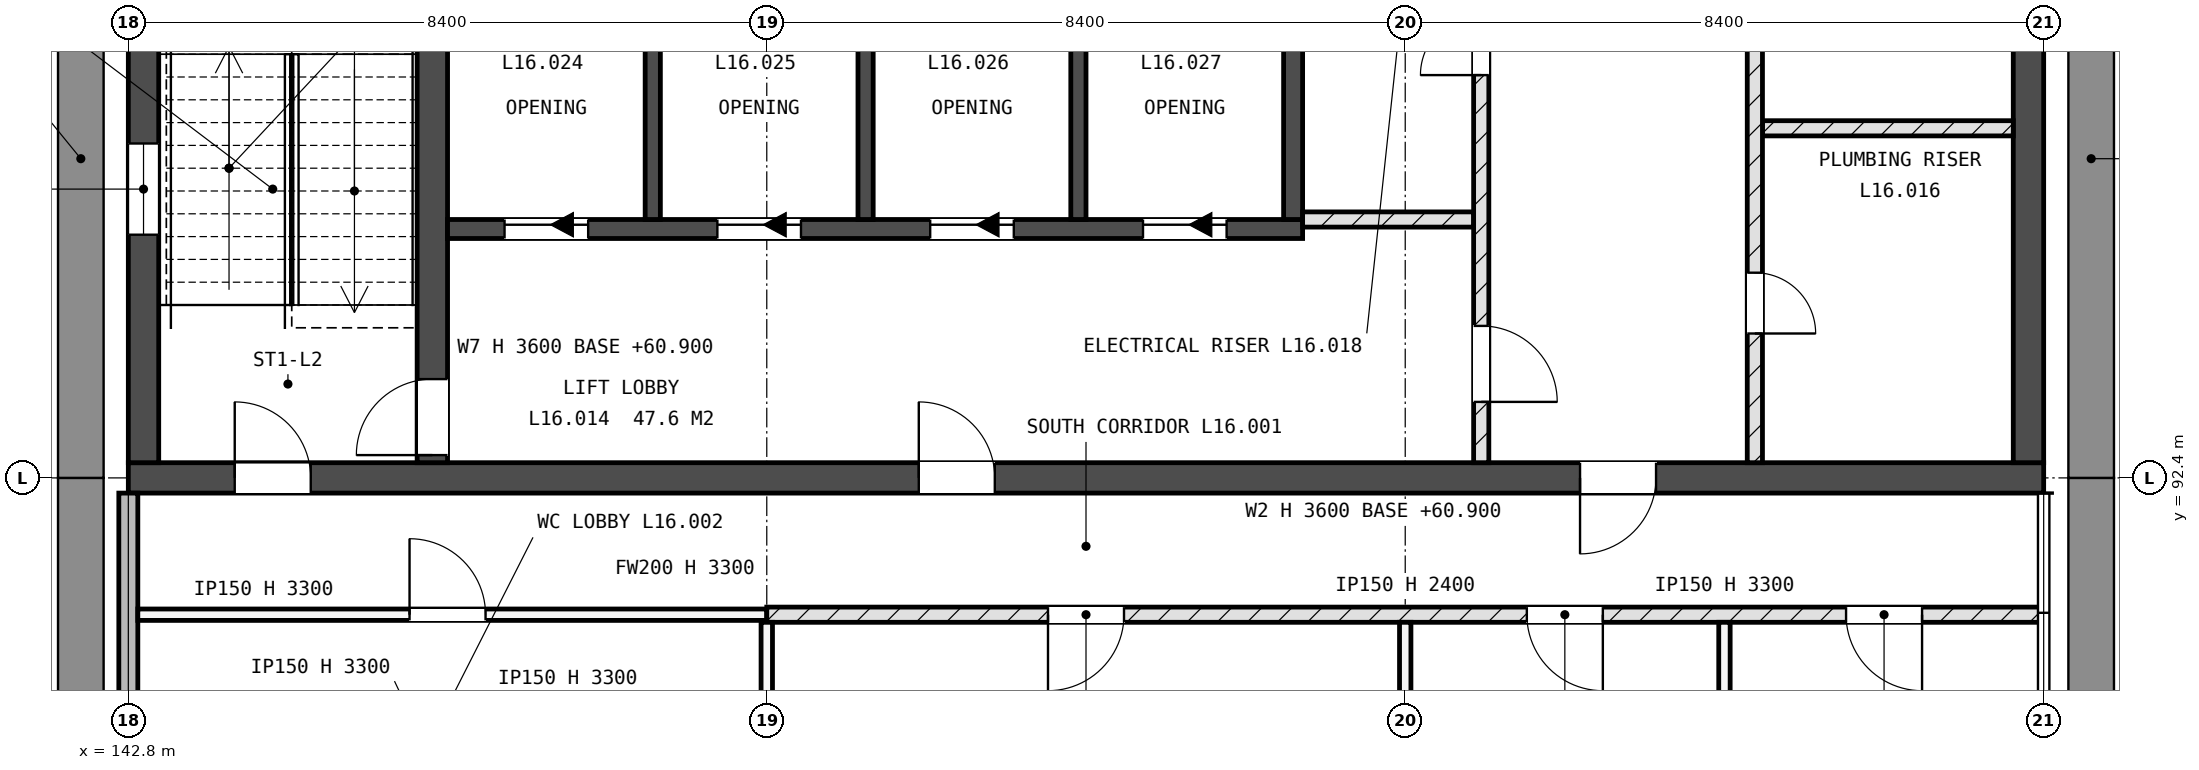
"""IFC4 building model, lengths in metres.
Left out: names, types, materials, properties, quantities, classifications, styles, units other than length and angle.
Written with IfcOpenShell. Run it as: python <this file> out.ifc"""

import sys

from ifc_helpers import new_model, si_unit, direction, frame, frame_2d, origin, place, context, subcontext, project, spatial, rectangle, extrude, element, fill, save


model = new_model("IFC4")
c1 = context("Model", 3, precision=1e-05, world=origin(), true_north=direction((0.0, 1.0)))
c2 = subcontext(c1, "Body", "Model", "MODEL_VIEW")
j1 = project(units=[si_unit("LENGTHUNIT", "METRE"), si_unit("PLANEANGLEUNIT", "RADIAN")], contexts=[c1])
p1 = place(None, origin())
s1 = spatial("IfcSite", under=j1, at=p1, CompositionType="ELEMENT")
p2 = place(p1, origin())
s2 = spatial("IfcBuilding", under=s1, at=p2, CompositionType="ELEMENT")
p3 = place(p2, frame((0.0, 0.0, 61.2)))
s3 = spatial("IfcBuildingStorey", under=s2, at=p3, CompositionType="ELEMENT", Elevation=61.2)
p4 = place(p3, frame((142.8, 92.4, -0.3), z_axis=(0.0, 0.0, 1.0), x_axis=(1.0, 0.0, 0.0)))
e1 = element("IfcWall", 1, at=p4, inside=s3, PredefinedType="SHEAR", context=c2, shape_type="SweptSolid", body=[
    extrude(rectangle(XDim=25.2, YDim=0.4, at=frame_2d((12.6, 0.0))), origin(), (0.0, 0.0, 1.0), 3.6),
])
p5 = place(p4, frame((1.4, 0.0, 0.3)))
e2 = element("IfcOpeningElement", 2, at=p5, cuts=e1, PredefinedType="OPENING", context=c2, shape_type="SweptSolid", body=[
    extrude(rectangle(XDim=1.0, YDim=2.1, at=frame_2d((0.5, 1.05))), frame((0.0, 0.21, 0.0), z_axis=(0.0, -1.0, 0.0), x_axis=(1.0, 0.0, 0.0)), (0.0, 0.0, 1.0), 0.42),
])
p6 = place(p4, frame((19.1, 0.0, 0.3)))
e3 = element("IfcOpeningElement", 3, at=p6, cuts=e1, PredefinedType="OPENING", context=c2, shape_type="SweptSolid", body=[
    extrude(rectangle(XDim=1.0, YDim=2.1, at=frame_2d((0.5, 1.05))), frame((0.0, 0.21, 0.0), z_axis=(0.0, -1.0, 0.0), x_axis=(1.0, 0.0, 0.0)), (0.0, 0.0, 1.0), 0.42),
])
p7 = place(p4, frame((10.4, 0.0, 0.3)))
e4 = element("IfcOpeningElement", 4, at=p7, cuts=e1, PredefinedType="OPENING", context=c2, shape_type="SweptSolid", body=[
    extrude(rectangle(XDim=1.0, YDim=2.1, at=frame_2d((0.5, 1.05))), frame((0.0, 0.21, 0.0), z_axis=(0.0, -1.0, 0.0), x_axis=(1.0, 0.0, 0.0)), (0.0, 0.0, 1.0), 0.42),
])
p8 = place(p3, frame((143.0, 92.6, -0.3), z_axis=(0.0, 0.0, 1.0), x_axis=(0.0, 1.0, 0.0)))
e5 = element("IfcWall", 5, at=p8, inside=s3, PredefinedType="SHEAR", context=c2, shape_type="SweptSolid", body=[
    extrude(rectangle(XDim=16.4, YDim=0.4, at=frame_2d((8.2, 0.0))), origin(), (0.0, 0.0, 1.0), 3.6),
])
p9 = place(p8, frame((3.0, 0.0, 1.9)))
e6 = element("IfcOpeningElement", 6, at=p9, cuts=e5, PredefinedType="OPENING", context=c2, shape_type="SweptSolid", body=[
    extrude(rectangle(XDim=1.2, YDim=0.9, at=frame_2d((0.6, 0.45))), frame((0.0, 0.21, 0.0), z_axis=(0.0, -1.0, 0.0), x_axis=(1.0, 0.0, 0.0)), (0.0, 0.0, 1.0), 0.42),
])
p10 = place(p3, frame((167.8, 92.6, -0.3), z_axis=(0.0, 0.0, 1.0), x_axis=(0.0, 1.0, 0.0)))
e7 = element("IfcWall", 7, at=p10, inside=s3, PredefinedType="SHEAR", context=c2, shape_type="SweptSolid", body=[
    extrude(rectangle(XDim=16.4, YDim=0.4, at=frame_2d((8.2, 0.0))), origin(), (0.0, 0.0, 1.0), 3.6),
])
p11 = place(p10, frame((12.2, 0.0, 1.9)))
e8 = element("IfcOpeningElement", 8, at=p11, cuts=e7, PredefinedType="OPENING", context=c2, shape_type="SweptSolid", body=[
    extrude(rectangle(XDim=1.2, YDim=0.9, at=frame_2d((0.6, 0.45))), frame((0.0, 0.21, 0.0), z_axis=(0.0, -1.0, 0.0), x_axis=(1.0, 0.0, 0.0)), (0.0, 0.0, 1.0), 0.42),
])
p12 = place(p3, frame((146.8, 92.6, -0.3), z_axis=(0.0, 0.0, 1.0), x_axis=(0.0, 1.0, 0.0)))
e9 = element("IfcWall", 9, at=p12, inside=s3, PredefinedType="SHEAR", context=c2, shape_type="SweptSolid", body=[
    extrude(rectangle(XDim=7.525, YDim=0.4, at=frame_2d((3.762, 0.0))), origin(), (0.0, 0.0, 1.0), 3.6),
])
p13 = place(p12, frame((0.1, 0.0, 0.3)))
e10 = element("IfcOpeningElement", 10, at=p13, cuts=e9, PredefinedType="OPENING", context=c2, shape_type="SweptSolid", body=[
    extrude(rectangle(XDim=1.0, YDim=2.1, at=frame_2d((0.5, 1.05))), frame((0.0, 0.21, 0.0), z_axis=(0.0, -1.0, 0.0), x_axis=(1.0, 0.0, 0.0)), (0.0, 0.0, 1.0), 0.42),
])
p14 = place(p3, frame((147.0, 95.675, -0.3), z_axis=(0.0, 0.0, 1.0), x_axis=(1.0, 0.0, 0.0)))
e11 = element("IfcWall", 11, at=p14, inside=s3, PredefinedType="SHEAR", context=c2, shape_type="SweptSolid", body=[
    extrude(rectangle(XDim=11.25, YDim=0.25, at=frame_2d((5.625, 0.0))), origin(), (0.0, 0.0, 1.0), 3.6),
])
p15 = place(p14, frame((0.75, 0.0, 0.3)))
e12 = element("IfcOpeningElement", 12, at=p15, cuts=e11, PredefinedType="OPENING", context=c2, shape_type="SweptSolid", body=[
    extrude(rectangle(XDim=1.1, YDim=2.1, at=frame_2d((0.55, 1.05))), frame((0.0, 0.135, 0.0), z_axis=(0.0, -1.0, 0.0), x_axis=(1.0, 0.0, 0.0)), (0.0, 0.0, 1.0), 0.27),
])
p16 = place(p14, frame((3.55, 0.0, 0.3)))
e13 = element("IfcOpeningElement", 13, at=p16, cuts=e11, PredefinedType="OPENING", context=c2, shape_type="SweptSolid", body=[
    extrude(rectangle(XDim=1.1, YDim=2.1, at=frame_2d((0.55, 1.05))), frame((0.0, 0.135, 0.0), z_axis=(0.0, -1.0, 0.0), x_axis=(1.0, 0.0, 0.0)), (0.0, 0.0, 1.0), 0.27),
])
p17 = place(p14, frame((6.35, 0.0, 0.3)))
e14 = element("IfcOpeningElement", 14, at=p17, cuts=e11, PredefinedType="OPENING", context=c2, shape_type="SweptSolid", body=[
    extrude(rectangle(XDim=1.1, YDim=2.1, at=frame_2d((0.55, 1.05))), frame((0.0, 0.135, 0.0), z_axis=(0.0, -1.0, 0.0), x_axis=(1.0, 0.0, 0.0)), (0.0, 0.0, 1.0), 0.27),
])
p18 = place(p14, frame((9.15, 0.0, 0.3)))
e15 = element("IfcOpeningElement", 15, at=p18, cuts=e11, PredefinedType="OPENING", context=c2, shape_type="SweptSolid", body=[
    extrude(rectangle(XDim=1.1, YDim=2.1, at=frame_2d((0.55, 1.05))), frame((0.0, 0.135, 0.0), z_axis=(0.0, -1.0, 0.0), x_axis=(1.0, 0.0, 0.0)), (0.0, 0.0, 1.0), 0.27),
])
p19 = place(p3, frame((158.125, 95.8, -0.3), z_axis=(0.0, 0.0, 1.0), x_axis=(0.0, 1.0, 0.0)))
e16 = element("IfcWall", 16, at=p19, inside=s3, PredefinedType="SHEAR", context=c2, shape_type="SweptSolid", body=[
    extrude(rectangle(XDim=2.9, YDim=0.25, at=frame_2d((1.45, 0.0))), origin(), (0.0, 0.0, 1.0), 3.6),
])
for number, where, z_axis, x_axis in (
    (17, (149.7, 95.8, -0.3), (0.0, 0.0, 1.0), (0.0, 1.0, 0.0)),
    (18, (152.5, 95.8, -0.3), (0.0, 0.0, 1.0), (0.0, 1.0, 0.0)),
    (19, (155.3, 95.8, -0.3), (0.0, 0.0, 1.0), (0.0, 1.0, 0.0)),
):
    element("IfcWall", number, at=place(p3, frame(where, z_axis=z_axis, x_axis=x_axis)), inside=s3, PredefinedType="SHEAR", context=c2, shape_type="SweptSolid", body=[
        extrude(rectangle(XDim=2.9, YDim=0.2, at=frame_2d((1.45, 0.0))), origin(), (0.0, 0.0, 1.0), 3.6),
    ])
p20 = place(p3, frame((142.8, 84.325, 0.0), z_axis=(0.0, 0.0, 1.0), x_axis=(0.0, 1.0, 0.0)))
e20 = element("IfcWall", 20, at=p20, inside=s3, PredefinedType="STANDARD", context=c2, shape_type="SweptSolid", body=[
    extrude(rectangle(XDim=7.875, YDim=0.25, at=frame_2d((3.938, 0.0))), origin(), (0.0, 0.0, 1.0), 3.3),
])
p21 = place(p20, frame((2.375, 0.0, 2.1)))
e21 = element("IfcOpeningElement", 21, at=p21, cuts=e20, PredefinedType="OPENING", context=c2, shape_type="SweptSolid", body=[
    extrude(rectangle(XDim=0.9, YDim=0.6, at=frame_2d((0.45, 0.3))), frame((0.0, 0.135, 0.0), z_axis=(0.0, -1.0, 0.0), x_axis=(1.0, 0.0, 0.0)), (0.0, 0.0, 1.0), 0.27),
])
p22 = place(p3, frame((142.925, 90.6, 0.0), z_axis=(0.0, 0.0, 1.0), x_axis=(1.0, 0.0, 0.0)))
e22 = element("IfcWall", 22, at=p22, inside=s3, PredefinedType="PARTITIONING", context=c2, shape_type="SweptSolid", body=[
    extrude(rectangle(XDim=8.275, YDim=0.15, at=frame_2d((4.137, 0.0))), origin(), (0.0, 0.0, 1.0), 3.3),
])
p23 = place(p22, frame((3.575, 0.0, 0.0)))
e23 = element("IfcOpeningElement", 23, at=p23, cuts=e22, PredefinedType="OPENING", context=c2, shape_type="SweptSolid", body=[
    extrude(rectangle(XDim=1.0, YDim=2.1, at=frame_2d((0.5, 1.05))), frame((0.0, 0.085, 0.0), z_axis=(0.0, -1.0, 0.0), x_axis=(1.0, 0.0, 0.0)), (0.0, 0.0, 1.0), 0.17),
])
p24 = place(p3, frame((151.2, 90.6, 0.0), z_axis=(0.0, 0.0, 1.0), x_axis=(1.0, 0.0, 0.0)))
e24 = element("IfcWall", 24, at=p24, inside=s3, PredefinedType="SOLIDWALL", context=c2, shape_type="SweptSolid", body=[
    extrude(rectangle(XDim=16.8, YDim=0.2, at=frame_2d((8.4, 0.0))), origin(), (0.0, 0.0, 1.0), 3.3),
])
p25 = place(p24, frame((3.7, 0.0, 0.0)))
e25 = element("IfcOpeningElement", 25, at=p25, cuts=e24, PredefinedType="OPENING", context=c2, shape_type="SweptSolid", body=[
    extrude(rectangle(XDim=1.0, YDim=2.1, at=frame_2d((0.5, 1.05))), frame((0.0, 0.11, 0.0), z_axis=(0.0, -1.0, 0.0), x_axis=(1.0, 0.0, 0.0)), (0.0, 0.0, 1.0), 0.22),
])
p26 = place(p24, frame((10.0, 0.0, 0.0)))
e26 = element("IfcOpeningElement", 26, at=p26, cuts=e24, PredefinedType="OPENING", context=c2, shape_type="SweptSolid", body=[
    extrude(rectangle(XDim=1.0, YDim=2.1, at=frame_2d((0.5, 1.05))), frame((0.0, 0.11, 0.0), z_axis=(0.0, -1.0, 0.0), x_axis=(1.0, 0.0, 0.0)), (0.0, 0.0, 1.0), 0.22),
])
p27 = place(p24, frame((14.2, 0.0, 0.0)))
e27 = element("IfcOpeningElement", 27, at=p27, cuts=e24, PredefinedType="OPENING", context=c2, shape_type="SweptSolid", body=[
    extrude(rectangle(XDim=1.0, YDim=2.1, at=frame_2d((0.5, 1.05))), frame((0.0, 0.11, 0.0), z_axis=(0.0, -1.0, 0.0), x_axis=(1.0, 0.0, 0.0)), (0.0, 0.0, 1.0), 0.22),
])
p28 = place(p3, frame((158.25, 95.8, 0.0), z_axis=(0.0, 0.0, 1.0), x_axis=(1.0, 0.0, 0.0)))
e28 = element("IfcWall", 28, at=p28, inside=s3, PredefinedType="SOLIDWALL", context=c2, shape_type="SweptSolid", body=[
    extrude(rectangle(XDim=2.25, YDim=0.2, at=frame_2d((1.125, 0.0))), origin(), (0.0, 0.0, 1.0), 3.3),
])
p29 = place(p3, frame((164.3, 97.0, 0.0), z_axis=(0.0, 0.0, 1.0), x_axis=(1.0, 0.0, 0.0)))
e29 = element("IfcWall", 29, at=p29, inside=s3, PredefinedType="SOLIDWALL", context=c2, shape_type="SweptSolid", body=[
    extrude(rectangle(XDim=3.3, YDim=0.2, at=frame_2d((1.65, 0.0))), origin(), (0.0, 0.0, 1.0), 3.3),
])
for number, where, z_axis, x_axis in (
    (30, (151.2, 84.0, 0.0), (0.0, 0.0, 1.0), (0.0, 1.0, 0.0)),
    (31, (159.6, 84.0, 0.0), (0.0, 0.0, 1.0), (0.0, 1.0, 0.0)),
):
    element("IfcWall", number, at=place(p3, frame(where, z_axis=z_axis, x_axis=x_axis)), inside=s3, PredefinedType="PARTITIONING", context=c2, shape_type="SweptSolid", body=[
        extrude(rectangle(XDim=6.5, YDim=0.15, at=frame_2d((3.25, 0.0))), origin(), (0.0, 0.0, 1.0), 2.4),
    ])
p30 = place(p3, frame((160.6, 92.6, 0.0), z_axis=(0.0, 0.0, 1.0), x_axis=(0.0, 1.0, 0.0)))
e32 = element("IfcWall", 32, at=p30, inside=s3, PredefinedType="SOLIDWALL", context=c2, shape_type="SweptSolid", body=[
    extrude(rectangle(XDim=12.5, YDim=0.2, at=frame_2d((6.25, 0.0))), origin(), (0.0, 0.0, 1.0), 3.3),
])
p31 = place(p30, frame((5.1, 0.0, 0.0)))
e33 = element("IfcOpeningElement", 33, at=p31, cuts=e32, PredefinedType="OPENING", context=c2, shape_type="SweptSolid", body=[
    extrude(rectangle(XDim=0.8, YDim=2.1, at=frame_2d((0.4, 1.05))), frame((0.0, 0.11, 0.0), z_axis=(0.0, -1.0, 0.0), x_axis=(1.0, 0.0, 0.0)), (0.0, 0.0, 1.0), 0.22),
])
p32 = place(p30, frame((0.8, 0.0, 0.0)))
e34 = element("IfcOpeningElement", 34, at=p32, cuts=e32, PredefinedType="OPENING", context=c2, shape_type="SweptSolid", body=[
    extrude(rectangle(XDim=1.0, YDim=2.1, at=frame_2d((0.5, 1.05))), frame((0.0, 0.11, 0.0), z_axis=(0.0, -1.0, 0.0), x_axis=(1.0, 0.0, 0.0)), (0.0, 0.0, 1.0), 0.22),
])
p33 = place(p3, frame((163.8, 84.0, 0.0), z_axis=(0.0, 0.0, 1.0), x_axis=(0.0, 1.0, 0.0)))
e35 = element("IfcWall", 35, at=p33, inside=s3, PredefinedType="PARTITIONING", context=c2, shape_type="SweptSolid", body=[
    extrude(rectangle(XDim=6.5, YDim=0.15, at=frame_2d((3.25, 0.0))), origin(), (0.0, 0.0, 1.0), 3.3),
])
p34 = place(p3, frame((164.2, 92.6, 0.0), z_axis=(0.0, 0.0, 1.0), x_axis=(0.0, 1.0, 0.0)))
e36 = element("IfcWall", 36, at=p34, inside=s3, PredefinedType="SOLIDWALL", context=c2, shape_type="SweptSolid", body=[
    extrude(rectangle(XDim=8.75, YDim=0.2, at=frame_2d((4.375, 0.0))), origin(), (0.0, 0.0, 1.0), 3.3),
])
p35 = place(p34, frame((1.7, 0.0, 0.0)))
e37 = element("IfcOpeningElement", 37, at=p35, cuts=e36, PredefinedType="OPENING", context=c2, shape_type="SweptSolid", body=[
    extrude(rectangle(XDim=0.8, YDim=2.1, at=frame_2d((0.4, 1.05))), frame((0.0, 0.11, 0.0), z_axis=(0.0, -1.0, 0.0), x_axis=(1.0, 0.0, 0.0)), (0.0, 0.0, 1.0), 0.22),
])
p36 = place(p34, frame((6.3, 0.0, 0.0)))
e38 = element("IfcOpeningElement", 38, at=p36, cuts=e36, PredefinedType="OPENING", context=c2, shape_type="SweptSolid", body=[
    extrude(rectangle(XDim=0.8, YDim=2.1, at=frame_2d((0.4, 1.05))), frame((0.0, 0.11, 0.0), z_axis=(0.0, -1.0, 0.0), x_axis=(1.0, 0.0, 0.0)), (0.0, 0.0, 1.0), 0.22),
])
p37 = place(p9, origin())
e39 = element("IfcWindow", 39, at=p37, inside=s3, PartitioningType="SINGLE_PANEL", PredefinedType="WINDOW", context=c2, shape_type="SweptSolid", body=[
    extrude(rectangle(XDim=1.2, YDim=0.9, at=frame_2d((0.6, 0.45))), frame((0.0, 0.03, 0.0), z_axis=(0.0, -1.0, 0.0), x_axis=(1.0, 0.0, 0.0)), (0.0, 0.0, 1.0), 0.06),
])
fill(e6, e39)
p38 = place(p15, origin())
e40 = element("IfcDoor", 40, at=p38, inside=s3, OperationType="SLIDING_TO_LEFT", PredefinedType="DOOR", context=c2, shape_type="SweptSolid", body=[
    extrude(rectangle(XDim=1.1, YDim=2.1, at=frame_2d((0.55, 1.05))), frame((0.0, 0.025, 0.0), z_axis=(0.0, -1.0, 0.0), x_axis=(1.0, 0.0, 0.0)), (0.0, 0.0, 1.0), 0.05),
])
fill(e12, e40)
p39 = place(p16, origin())
e41 = element("IfcDoor", 41, at=p39, inside=s3, OperationType="SLIDING_TO_LEFT", PredefinedType="DOOR", context=c2, shape_type="SweptSolid", body=[
    extrude(rectangle(XDim=1.1, YDim=2.1, at=frame_2d((0.55, 1.05))), frame((0.0, 0.025, 0.0), z_axis=(0.0, -1.0, 0.0), x_axis=(1.0, 0.0, 0.0)), (0.0, 0.0, 1.0), 0.05),
])
fill(e13, e41)
p40 = place(p17, origin())
e42 = element("IfcDoor", 42, at=p40, inside=s3, OperationType="SLIDING_TO_LEFT", PredefinedType="DOOR", context=c2, shape_type="SweptSolid", body=[
    extrude(rectangle(XDim=1.1, YDim=2.1, at=frame_2d((0.55, 1.05))), frame((0.0, 0.025, 0.0), z_axis=(0.0, -1.0, 0.0), x_axis=(1.0, 0.0, 0.0)), (0.0, 0.0, 1.0), 0.05),
])
fill(e14, e42)
p41 = place(p18, origin())
e43 = element("IfcDoor", 43, at=p41, inside=s3, OperationType="SLIDING_TO_LEFT", PredefinedType="DOOR", context=c2, shape_type="SweptSolid", body=[
    extrude(rectangle(XDim=1.1, YDim=2.1, at=frame_2d((0.55, 1.05))), frame((0.0, 0.025, 0.0), z_axis=(0.0, -1.0, 0.0), x_axis=(1.0, 0.0, 0.0)), (0.0, 0.0, 1.0), 0.05),
])
fill(e15, e43)
p42 = place(p5, origin())
e44 = element("IfcDoor", 44, at=p42, inside=s3, OperationType="SINGLE_SWING_RIGHT", PredefinedType="DOOR", context=c2, shape_type="SweptSolid", body=[
    extrude(rectangle(XDim=1.0, YDim=2.1, at=frame_2d((0.5, 1.05))), frame((0.0, 0.025, 0.0), z_axis=(0.0, -1.0, 0.0), x_axis=(1.0, 0.0, 0.0)), (0.0, 0.0, 1.0), 0.05),
])
fill(e2, e44)
p43 = place(p13, origin())
e45 = element("IfcDoor", 45, at=p43, inside=s3, OperationType="SINGLE_SWING_RIGHT", PredefinedType="DOOR", context=c2, shape_type="SweptSolid", body=[
    extrude(rectangle(XDim=1.0, YDim=2.1, at=frame_2d((0.5, 1.05))), frame((0.0, 0.025, 0.0), z_axis=(0.0, -1.0, 0.0), x_axis=(1.0, 0.0, 0.0)), (0.0, 0.0, 1.0), 0.05),
])
fill(e10, e45)
p44 = place(p25, origin())
e46 = element("IfcDoor", 46, at=p44, inside=s3, OperationType="SINGLE_SWING_LEFT", PredefinedType="DOOR", context=c2, shape_type="SweptSolid", body=[
    extrude(rectangle(XDim=1.0, YDim=2.1, at=frame_2d((0.5, 1.05))), frame((0.0, 0.025, 0.0), z_axis=(0.0, -1.0, 0.0), x_axis=(1.0, 0.0, 0.0)), (0.0, 0.0, 1.0), 0.05),
])
fill(e25, e46)
p45 = place(p26, origin())
e47 = element("IfcDoor", 47, at=p45, inside=s3, OperationType="SINGLE_SWING_RIGHT", PredefinedType="DOOR", context=c2, shape_type="SweptSolid", body=[
    extrude(rectangle(XDim=1.0, YDim=2.1, at=frame_2d((0.5, 1.05))), frame((0.0, 0.025, 0.0), z_axis=(0.0, -1.0, 0.0), x_axis=(1.0, 0.0, 0.0)), (0.0, 0.0, 1.0), 0.05),
])
fill(e26, e47)
p46 = place(p27, origin())
e48 = element("IfcDoor", 48, at=p46, inside=s3, OperationType="SINGLE_SWING_RIGHT", PredefinedType="DOOR", context=c2, shape_type="SweptSolid", body=[
    extrude(rectangle(XDim=1.0, YDim=2.1, at=frame_2d((0.5, 1.05))), frame((0.0, 0.025, 0.0), z_axis=(0.0, -1.0, 0.0), x_axis=(1.0, 0.0, 0.0)), (0.0, 0.0, 1.0), 0.05),
])
fill(e27, e48)
p47 = place(p35, origin())
e49 = element("IfcDoor", 49, at=p47, inside=s3, OperationType="SINGLE_SWING_LEFT", PredefinedType="DOOR", context=c2, shape_type="SweptSolid", body=[
    extrude(rectangle(XDim=0.8, YDim=2.1, at=frame_2d((0.4, 1.05))), frame((0.0, 0.025, 0.0), z_axis=(0.0, -1.0, 0.0), x_axis=(1.0, 0.0, 0.0)), (0.0, 0.0, 1.0), 0.05),
])
fill(e37, e49)
p48 = place(p31, origin())
e50 = element("IfcDoor", 50, at=p48, inside=s3, OperationType="SINGLE_SWING_RIGHT", PredefinedType="DOOR", context=c2, shape_type="SweptSolid", body=[
    extrude(rectangle(XDim=0.8, YDim=2.1, at=frame_2d((0.4, 1.05))), frame((0.0, 0.025, 0.0), z_axis=(0.0, -1.0, 0.0), x_axis=(1.0, 0.0, 0.0)), (0.0, 0.0, 1.0), 0.05),
])
fill(e33, e50)
p49 = place(p23, origin())
e51 = element("IfcDoor", 51, at=p49, inside=s3, OperationType="SINGLE_SWING_RIGHT", PredefinedType="DOOR", context=c2, shape_type="SweptSolid", body=[
    extrude(rectangle(XDim=1.0, YDim=2.1, at=frame_2d((0.5, 1.05))), frame((0.0, 0.025, 0.0), z_axis=(0.0, -1.0, 0.0), x_axis=(1.0, 0.0, 0.0)), (0.0, 0.0, 1.0), 0.05),
])
fill(e23, e51)
p50 = place(p6, origin())
e52 = element("IfcDoor", 52, at=p50, inside=s3, OperationType="SINGLE_SWING_LEFT", PredefinedType="DOOR", context=c2, shape_type="SweptSolid", body=[
    extrude(rectangle(XDim=1.0, YDim=2.1, at=frame_2d((0.5, 1.05))), frame((0.0, 0.025, 0.0), z_axis=(0.0, -1.0, 0.0), x_axis=(1.0, 0.0, 0.0)), (0.0, 0.0, 1.0), 0.05),
])
fill(e3, e52)
p51 = place(p7, origin())
e53 = element("IfcDoor", 53, at=p51, inside=s3, OperationType="SINGLE_SWING_RIGHT", PredefinedType="DOOR", context=c2, shape_type="SweptSolid", body=[
    extrude(rectangle(XDim=1.0, YDim=2.1, at=frame_2d((0.5, 1.05))), frame((0.0, 0.025, 0.0), z_axis=(0.0, -1.0, 0.0), x_axis=(1.0, 0.0, 0.0)), (0.0, 0.0, 1.0), 0.05),
])
fill(e4, e53)
p52 = place(p32, origin())
e54 = element("IfcDoor", 54, at=p52, inside=s3, OperationType="SINGLE_SWING_LEFT", PredefinedType="DOOR", context=c2, shape_type="SweptSolid", body=[
    extrude(rectangle(XDim=1.0, YDim=2.1, at=frame_2d((0.5, 1.05))), frame((0.0, 0.025, 0.0), z_axis=(0.0, -1.0, 0.0), x_axis=(1.0, 0.0, 0.0)), (0.0, 0.0, 1.0), 0.05),
])
fill(e34, e54)
save(model, sys.argv[1])
